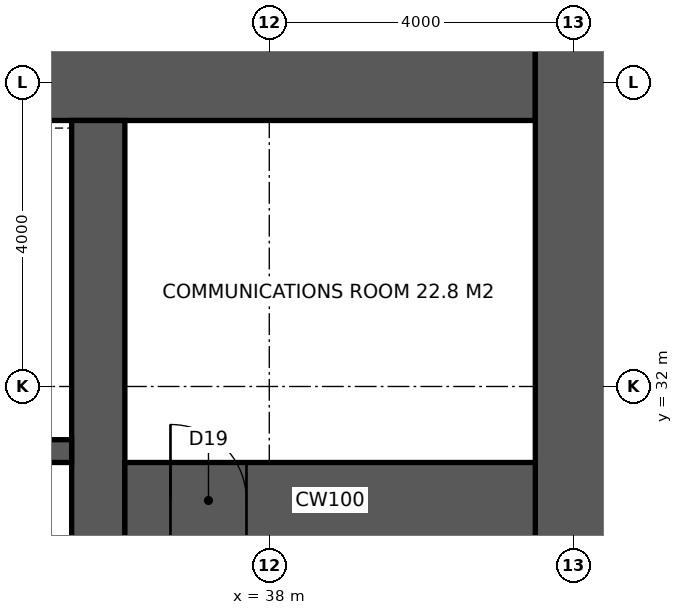
"""IFC4 building model, lengths in metres.
Left out: names, types, materials, properties, quantities, classifications, styles, units other than length and angle.
Written with IfcOpenShell. Run it as: python <this file> out.ifc"""

import sys

from ifc_helpers import new_model, si_unit, direction, frame, frame_2d, origin, place, context, subcontext, project, spatial, rectangle, extrude, element, fill, save


model = new_model("IFC4")
c1 = context("Model", 3, precision=1e-05, world=origin(), true_north=direction((0.0, 1.0)))
c2 = subcontext(c1, "Body", "Model", "MODEL_VIEW")
j1 = project(units=[si_unit("LENGTHUNIT", "METRE"), si_unit("PLANEANGLEUNIT", "RADIAN")], contexts=[c1])
p1 = place(None, origin())
s1 = spatial("IfcSite", under=j1, at=p1, CompositionType="ELEMENT")
p2 = place(p1, origin())
s2 = spatial("IfcBuilding", under=s1, at=p2, CompositionType="ELEMENT")
p3 = place(p2, frame((0.0, 0.0, 15.0)))
s3 = spatial("IfcBuildingStorey", under=s2, at=p3, CompositionType="ELEMENT", Elevation=15.0)
p4 = place(p3, frame((18.5, 36.2, -0.15), z_axis=(0.0, 0.0, 1.0), x_axis=(1.0, 0.0, 0.0)))
e1 = element("IfcWall", 1, at=p4, inside=s3, PredefinedType="SHEAR", context=c2, shape_type="SweptSolid", body=[
    extrude(rectangle(XDim=23.0, YDim=1.4, at=frame_2d((11.5, 0.0))), origin(), (0.0, 0.0, 1.0), 4.0),
])
p5 = place(p3, frame((42.0, 17.1, -0.15), z_axis=(0.0, 0.0, 1.0), x_axis=(0.0, 1.0, 0.0)))
e2 = element("IfcWall", 2, at=p5, inside=s3, PredefinedType="SHEAR", context=c2, shape_type="SweptSolid", body=[
    extrude(rectangle(XDim=19.8, YDim=1.0, at=frame_2d((9.9, 0.0))), origin(), (0.0, 0.0, 1.0), 4.0),
])
p6 = place(p3, frame((35.75, 18.5, -0.15), z_axis=(0.0, 0.0, 1.0), x_axis=(0.0, 1.0, 0.0)))
e3 = element("IfcWall", 3, at=p6, inside=s3, PredefinedType="SHEAR", context=c2, shape_type="SweptSolid", body=[
    extrude(rectangle(XDim=17.0, YDim=0.7, at=frame_2d((8.5, 0.0))), origin(), (0.0, 0.0, 1.0), 4.0),
])
p7 = place(p6, frame((9.85, 0.0, 0.15)))
e4 = element("IfcOpeningElement", 4, at=p7, cuts=e3, PredefinedType="OPENING", context=c2, shape_type="SweptSolid", body=[
    extrude(rectangle(XDim=1.0, YDim=2.2, at=frame_2d((0.5, 1.1))), frame((0.0, 0.36, 0.0), z_axis=(0.0, -1.0, 0.0), x_axis=(1.0, 0.0, 0.0)), (0.0, 0.0, 1.0), 0.72),
])
p8 = place(p3, frame((24.15, 31.15, -0.15), z_axis=(0.0, 0.0, 1.0), x_axis=(1.0, 0.0, 0.0)))
e5 = element("IfcWall", 5, at=p8, inside=s3, PredefinedType="SHEAR", context=c2, shape_type="SweptSolid", body=[
    extrude(rectangle(XDim=11.25, YDim=0.3, at=frame_2d((5.625, 0.0))), origin(), (0.0, 0.0, 1.0), 4.0),
])
p9 = place(p8, frame((7.25, 0.0, 0.15)))
e6 = element("IfcOpeningElement", 6, at=p9, cuts=e5, PredefinedType="OPENING", context=c2, shape_type="SweptSolid", body=[
    extrude(rectangle(XDim=1.4, YDim=2.4, at=frame_2d((0.7, 1.2))), frame((0.0, 0.16, 0.0), z_axis=(0.0, -1.0, 0.0), x_axis=(1.0, 0.0, 0.0)), (0.0, 0.0, 1.0), 0.32),
])
p10 = place(p3, frame((36.1, 30.5, -0.15), z_axis=(0.0, 0.0, 1.0), x_axis=(1.0, 0.0, 0.0)))
e7 = element("IfcWall", 7, at=p10, inside=s3, PredefinedType="SHEAR", context=c2, shape_type="SweptSolid", body=[
    extrude(rectangle(XDim=5.4, YDim=1.0, at=frame_2d((2.7, 0.0))), origin(), (0.0, 0.0, 1.0), 4.0),
])
p11 = place(p10, frame((0.6, 0.0, 0.15)))
e8 = element("IfcOpeningElement", 8, at=p11, cuts=e7, PredefinedType="OPENING", context=c2, shape_type="SweptSolid", body=[
    extrude(rectangle(XDim=1.0, YDim=2.2, at=frame_2d((0.5, 1.1))), frame((0.0, 0.51, 0.0), z_axis=(0.0, -1.0, 0.0), x_axis=(1.0, 0.0, 0.0)), (0.0, 0.0, 1.0), 1.02),
])
p12 = place(p11, origin())
e9 = element("IfcDoor", 9, at=p12, inside=s3, OperationType="SINGLE_SWING_LEFT", PredefinedType="DOOR", context=c2, shape_type="SweptSolid", body=[
    extrude(rectangle(XDim=1.0, YDim=2.2, at=frame_2d((0.5, 1.1))), frame((0.0, 0.025, 0.0), z_axis=(0.0, -1.0, 0.0), x_axis=(1.0, 0.0, 0.0)), (0.0, 0.0, 1.0), 0.05),
])
fill(e8, e9)
save(model, sys.argv[1])
